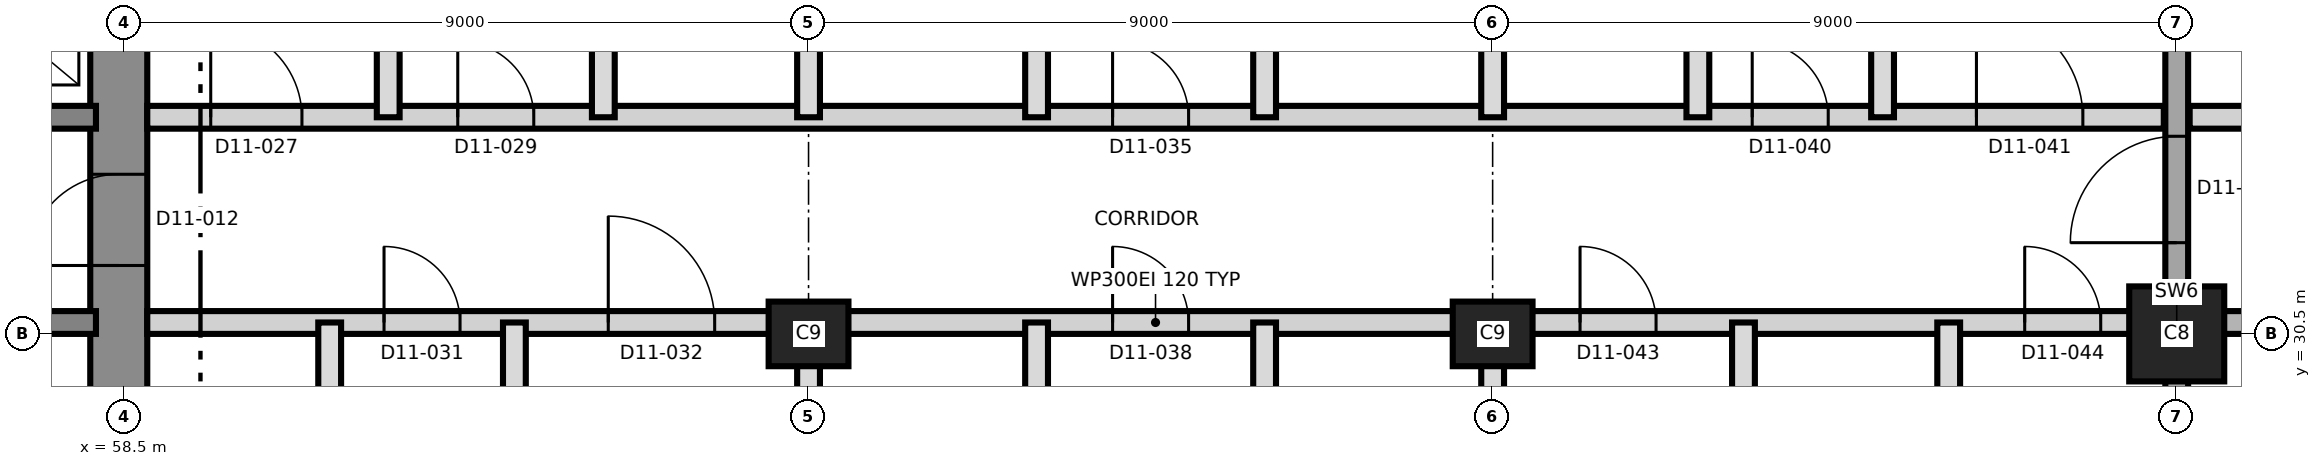
"""IFC4 building model, lengths in metres.
Left out: names, types, materials, properties, quantities, classifications, styles, units other than length and angle.
Written with IfcOpenShell. Run it as: python <this file> out.ifc"""

import sys

from ifc_helpers import new_model, si_unit, direction, frame, frame_2d, origin, origin_2d, place, context, subcontext, project, spatial, rectangle, extrude, element, fill, save


model = new_model("IFC4")
c1 = context("Model", 3, precision=1e-05, world=origin(), true_north=direction((0.0, 1.0)))
c2 = subcontext(c1, "Body", "Model", "MODEL_VIEW")
j1 = project(units=[si_unit("LENGTHUNIT", "METRE"), si_unit("PLANEANGLEUNIT", "RADIAN")], contexts=[c1])
p1 = place(None, origin())
s1 = spatial("IfcSite", under=j1, at=p1, CompositionType="ELEMENT")
p2 = place(p1, origin())
s2 = spatial("IfcBuilding", under=s1, at=p2, CompositionType="ELEMENT")
p3 = place(p2, frame((0.0, 0.0, 124.1)))
s3 = spatial("IfcBuildingStorey", under=s2, at=p3, CompositionType="ELEMENT", Elevation=124.1)
p4 = place(p3, frame((58.425, 21.125, 0.0), z_axis=(0.0, 0.0, 1.0), x_axis=(0.0, 1.0, 0.0)))
e1 = element("IfcWall", 1, at=p4, inside=s3, PredefinedType="SHEAR", context=c2, shape_type="SweptSolid", body=[
    extrude(rectangle(XDim=18.75, YDim=0.75, at=frame_2d((9.375, 0.0))), origin(), (0.0, 0.0, 1.0), 3.7),
])
p5 = place(p4, frame((10.275, 0.0, 0.0)))
e2 = element("IfcOpeningElement", 2, at=p5, cuts=e1, PredefinedType="OPENING", context=c2, shape_type="SweptSolid", body=[
    extrude(rectangle(XDim=1.2, YDim=2.1, at=frame_2d((0.6, 1.05))), frame((0.0, 0.385, 0.0), z_axis=(0.0, -1.0, 0.0), x_axis=(1.0, 0.0, 0.0)), (0.0, 0.0, 1.0), 0.77),
])
p6 = place(p3, frame((31.875, 30.65, 0.0), z_axis=(0.0, 0.0, 1.0), x_axis=(1.0, 0.0, 0.0)))
e3 = element("IfcWall", 3, at=p6, inside=s3, PredefinedType="SHEAR", context=c2, shape_type="SweptSolid", body=[
    extrude(rectangle(XDim=26.25, YDim=0.3, at=frame_2d((13.125, 0.0))), origin(), (0.0, 0.0, 1.0), 3.7),
])
p7 = place(p6, frame((24.625, 0.0, 0.0)))
e4 = element("IfcOpeningElement", 4, at=p7, cuts=e3, PredefinedType="OPENING", context=c2, shape_type="SweptSolid", body=[
    extrude(rectangle(XDim=1.0, YDim=2.1, at=frame_2d((0.5, 1.05))), frame((0.0, 0.16, 0.0), z_axis=(0.0, -1.0, 0.0), x_axis=(1.0, 0.0, 0.0)), (0.0, 0.0, 1.0), 0.32),
])
p8 = place(p6, frame((11.425, 0.0, 0.0)))
e5 = element("IfcOpeningElement", 5, at=p8, cuts=e3, PredefinedType="OPENING", context=c2, shape_type="SweptSolid", body=[
    extrude(rectangle(XDim=1.0, YDim=2.1, at=frame_2d((0.5, 1.05))), frame((0.0, 0.16, 0.0), z_axis=(0.0, -1.0, 0.0), x_axis=(1.0, 0.0, 0.0)), (0.0, 0.0, 1.0), 0.32),
])
p9 = place(p3, frame((31.875, 33.35, 0.0), z_axis=(0.0, 0.0, 1.0), x_axis=(1.0, 0.0, 0.0)))
e6 = element("IfcWall", 6, at=p9, inside=s3, PredefinedType="SHEAR", context=c2, shape_type="SweptSolid", body=[
    extrude(rectangle(XDim=26.25, YDim=0.3, at=frame_2d((13.125, 0.0))), origin(), (0.0, 0.0, 1.0), 3.7),
])
p10 = place(p9, frame((13.2, 0.0, 0.0)))
e7 = element("IfcOpeningElement", 7, at=p10, cuts=e6, PredefinedType="OPENING", context=c2, shape_type="SweptSolid", body=[
    extrude(rectangle(XDim=1.4, YDim=2.1, at=frame_2d((0.7, 1.05))), frame((0.0, 0.16, 0.0), z_axis=(0.0, -1.0, 0.0), x_axis=(1.0, 0.0, 0.0)), (0.0, 0.0, 1.0), 0.32),
])
p11 = place(p9, frame((5.25, 0.0, 0.0)))
e8 = element("IfcOpeningElement", 8, at=p11, cuts=e6, PredefinedType="OPENING", context=c2, shape_type="SweptSolid", body=[
    extrude(rectangle(XDim=1.2, YDim=2.1, at=frame_2d((0.6, 1.05))), frame((0.0, 0.16, 0.0), z_axis=(0.0, -1.0, 0.0), x_axis=(1.0, 0.0, 0.0)), (0.0, 0.0, 1.0), 0.32),
])
p12 = place(p9, frame((19.8, 0.0, 0.0)))
e9 = element("IfcOpeningElement", 9, at=p12, cuts=e6, PredefinedType="OPENING", context=c2, shape_type="SweptSolid", body=[
    extrude(rectangle(XDim=1.2, YDim=2.1, at=frame_2d((0.6, 1.05))), frame((0.0, 0.16, 0.0), z_axis=(0.0, -1.0, 0.0), x_axis=(1.0, 0.0, 0.0)), (0.0, 0.0, 1.0), 0.32),
])
for number, where, z_axis, x_axis in (
    (10, (67.5, 30.5, 0.0), (0.0, 0.0, 1.0), (1.0, 0.0, 0.0)),
    (11, (76.5, 30.5, 0.0), (0.0, 0.0, 1.0), (1.0, 0.0, 0.0)),
):
    element("IfcColumn", number, at=place(p3, frame(where, z_axis=z_axis, x_axis=x_axis)), inside=s3, PredefinedType="COLUMN", context=c2, shape_type="SweptSolid", body=[
        extrude(rectangle(XDim=1.05, YDim=0.85, at=origin_2d()), origin(), (0.0, 0.0, 1.0), 3.7),
    ])
p13 = place(p3, frame((85.5, 30.5, 0.0), z_axis=(0.0, 0.0, 1.0), x_axis=(1.0, 0.0, 0.0)))
e12 = element("IfcColumn", 12, at=p13, inside=s3, PredefinedType="COLUMN", context=c2, shape_type="SweptSolid", body=[
    extrude(rectangle(XDim=1.25, YDim=1.25, at=origin_2d()), origin(), (0.0, 0.0, 1.0), 3.7),
])
p14 = place(p3, frame((85.5, 20.135, 0.0), z_axis=(0.0, 0.0, 1.0), x_axis=(0.0, 1.0, 0.0)))
e13 = element("IfcWall", 13, at=p14, inside=s3, PredefinedType="SHEAR", context=c2, shape_type="SweptSolid", body=[
    extrude(rectangle(XDim=20.73, YDim=0.3, at=frame_2d((10.365, 0.0))), origin(), (0.0, 0.0, 1.0), 3.7),
])
p15 = place(p14, frame((11.565, 0.0, 0.0)))
e14 = element("IfcOpeningElement", 14, at=p15, cuts=e13, PredefinedType="OPENING", context=c2, shape_type="SweptSolid", body=[
    extrude(rectangle(XDim=1.4, YDim=2.1, at=frame_2d((0.7, 1.05))), frame((0.0, 0.16, 0.0), z_axis=(0.0, -1.0, 0.0), x_axis=(1.0, 0.0, 0.0)), (0.0, 0.0, 1.0), 0.32),
])
p16 = place(p3, frame((58.8, 30.65, 0.0), z_axis=(0.0, 0.0, 1.0), x_axis=(1.0, 0.0, 0.0)))
e15 = element("IfcWall", 15, at=p16, inside=s3, PredefinedType="PARTITIONING", context=c2, shape_type="SweptSolid", body=[
    extrude(rectangle(XDim=26.53, YDim=0.3, at=frame_2d((13.265, 0.0))), origin(), (0.0, 0.0, 1.0), 3.4),
])
p17 = place(p16, frame((3.115, 0.0, 0.0)))
e16 = element("IfcOpeningElement", 16, at=p17, cuts=e15, PredefinedType="OPENING", context=c2, shape_type="SweptSolid", body=[
    extrude(rectangle(XDim=1.0, YDim=2.1, at=frame_2d((0.5, 1.05))), frame((0.0, 0.16, 0.0), z_axis=(0.0, -1.0, 0.0), x_axis=(1.0, 0.0, 0.0)), (0.0, 0.0, 1.0), 0.32),
])
p18 = place(p16, frame((6.065, 0.0, 0.0)))
e17 = element("IfcOpeningElement", 17, at=p18, cuts=e15, PredefinedType="OPENING", context=c2, shape_type="SweptSolid", body=[
    extrude(rectangle(XDim=1.4, YDim=2.1, at=frame_2d((0.7, 1.05))), frame((0.0, 0.16, 0.0), z_axis=(0.0, -1.0, 0.0), x_axis=(1.0, 0.0, 0.0)), (0.0, 0.0, 1.0), 0.32),
])
p19 = place(p16, frame((12.7, 0.0, 0.0)))
e18 = element("IfcOpeningElement", 18, at=p19, cuts=e15, PredefinedType="OPENING", context=c2, shape_type="SweptSolid", body=[
    extrude(rectangle(XDim=1.0, YDim=2.4, at=frame_2d((0.5, 1.2))), frame((0.0, 0.16, 0.0), z_axis=(0.0, -1.0, 0.0), x_axis=(1.0, 0.0, 0.0)), (0.0, 0.0, 1.0), 0.32),
])
p20 = place(p16, frame((18.85, 0.0, 0.0)))
e19 = element("IfcOpeningElement", 19, at=p20, cuts=e15, PredefinedType="OPENING", context=c2, shape_type="SweptSolid", body=[
    extrude(rectangle(XDim=1.0, YDim=2.1, at=frame_2d((0.5, 1.05))), frame((0.0, 0.16, 0.0), z_axis=(0.0, -1.0, 0.0), x_axis=(1.0, 0.0, 0.0)), (0.0, 0.0, 1.0), 0.32),
])
p21 = place(p16, frame((24.7, 0.0, 0.0)))
e20 = element("IfcOpeningElement", 20, at=p21, cuts=e15, PredefinedType="OPENING", context=c2, shape_type="SweptSolid", body=[
    extrude(rectangle(XDim=1.0, YDim=2.1, at=frame_2d((0.5, 1.05))), frame((0.0, 0.16, 0.0), z_axis=(0.0, -1.0, 0.0), x_axis=(1.0, 0.0, 0.0)), (0.0, 0.0, 1.0), 0.32),
])
p22 = place(p3, frame((85.67, 30.65, 0.0), z_axis=(0.0, 0.0, 1.0), x_axis=(1.0, 0.0, 0.0)))
e21 = element("IfcWall", 21, at=p22, inside=s3, PredefinedType="SHEAR", context=c2, shape_type="SweptSolid", body=[
    extrude(rectangle(XDim=9.58, YDim=0.3, at=frame_2d((4.79, 0.0))), origin(), (0.0, 0.0, 1.0), 3.4),
])
p23 = place(p22, frame((2.08, 0.0, 0.0)))
e22 = element("IfcOpeningElement", 22, at=p23, cuts=e21, PredefinedType="OPENING", context=c2, shape_type="SweptSolid", body=[
    extrude(rectangle(XDim=1.2, YDim=2.1, at=frame_2d((0.6, 1.05))), frame((0.0, 0.16, 0.0), z_axis=(0.0, -1.0, 0.0), x_axis=(1.0, 0.0, 0.0)), (0.0, 0.0, 1.0), 0.32),
])
p24 = place(p22, frame((5.63, 0.0, 0.0)))
e23 = element("IfcOpeningElement", 23, at=p24, cuts=e21, PredefinedType="OPENING", context=c2, shape_type="SweptSolid", body=[
    extrude(rectangle(XDim=1.0, YDim=2.1, at=frame_2d((0.5, 1.05))), frame((0.0, 0.16, 0.0), z_axis=(0.0, -1.0, 0.0), x_axis=(1.0, 0.0, 0.0)), (0.0, 0.0, 1.0), 0.32),
])
p25 = place(p3, frame((58.8, 33.35, 0.0), z_axis=(0.0, 0.0, 1.0), x_axis=(1.0, 0.0, 0.0)))
e24 = element("IfcWall", 24, at=p25, inside=s3, PredefinedType="PARTITIONING", context=c2, shape_type="SweptSolid", body=[
    extrude(rectangle(XDim=26.53, YDim=0.3, at=frame_2d((13.265, 0.0))), origin(), (0.0, 0.0, 1.0), 3.4),
])
p26 = place(p25, frame((0.835, 0.0, 0.0)))
e25 = element("IfcOpeningElement", 25, at=p26, cuts=e24, PredefinedType="OPENING", context=c2, shape_type="SweptSolid", body=[
    extrude(rectangle(XDim=1.2, YDim=2.1, at=frame_2d((0.6, 1.05))), frame((0.0, 0.16, 0.0), z_axis=(0.0, -1.0, 0.0), x_axis=(1.0, 0.0, 0.0)), (0.0, 0.0, 1.0), 0.32),
])
p27 = place(p25, frame((4.085, 0.0, 0.0)))
e26 = element("IfcOpeningElement", 26, at=p27, cuts=e24, PredefinedType="OPENING", context=c2, shape_type="SweptSolid", body=[
    extrude(rectangle(XDim=1.0, YDim=2.1, at=frame_2d((0.5, 1.05))), frame((0.0, 0.16, 0.0), z_axis=(0.0, -1.0, 0.0), x_axis=(1.0, 0.0, 0.0)), (0.0, 0.0, 1.0), 0.32),
])
p28 = place(p25, frame((12.7, 0.0, 0.0)))
e27 = element("IfcOpeningElement", 27, at=p28, cuts=e24, PredefinedType="OPENING", context=c2, shape_type="SweptSolid", body=[
    extrude(rectangle(XDim=1.0, YDim=2.4, at=frame_2d((0.5, 1.2))), frame((0.0, 0.16, 0.0), z_axis=(0.0, -1.0, 0.0), x_axis=(1.0, 0.0, 0.0)), (0.0, 0.0, 1.0), 0.32),
])
p29 = place(p25, frame((21.115, 0.0, 0.0)))
e28 = element("IfcOpeningElement", 28, at=p29, cuts=e24, PredefinedType="OPENING", context=c2, shape_type="SweptSolid", body=[
    extrude(rectangle(XDim=1.0, YDim=2.1, at=frame_2d((0.5, 1.05))), frame((0.0, 0.16, 0.0), z_axis=(0.0, -1.0, 0.0), x_axis=(1.0, 0.0, 0.0)), (0.0, 0.0, 1.0), 0.32),
])
p30 = place(p25, frame((24.065, 0.0, 0.0)))
e29 = element("IfcOpeningElement", 29, at=p30, cuts=e24, PredefinedType="OPENING", context=c2, shape_type="SweptSolid", body=[
    extrude(rectangle(XDim=1.4, YDim=2.1, at=frame_2d((0.7, 1.05))), frame((0.0, 0.16, 0.0), z_axis=(0.0, -1.0, 0.0), x_axis=(1.0, 0.0, 0.0)), (0.0, 0.0, 1.0), 0.32),
])
p31 = place(p3, frame((85.67, 33.35, 0.0), z_axis=(0.0, 0.0, 1.0), x_axis=(1.0, 0.0, 0.0)))
e30 = element("IfcWall", 30, at=p31, inside=s3, PredefinedType="PARTITIONING", context=c2, shape_type="SweptSolid", body=[
    extrude(rectangle(XDim=9.58, YDim=0.3, at=frame_2d((4.79, 0.0))), origin(), (0.0, 0.0, 1.0), 3.4),
])
p32 = place(p31, frame((1.83, 0.0, 0.0)))
e31 = element("IfcOpeningElement", 31, at=p32, cuts=e30, PredefinedType="OPENING", context=c2, shape_type="SweptSolid", body=[
    extrude(rectangle(XDim=1.0, YDim=2.1, at=frame_2d((0.5, 1.05))), frame((0.0, 0.16, 0.0), z_axis=(0.0, -1.0, 0.0), x_axis=(1.0, 0.0, 0.0)), (0.0, 0.0, 1.0), 0.32),
])
p33 = place(p31, frame((5.63, 0.0, 0.0)))
e32 = element("IfcOpeningElement", 32, at=p33, cuts=e30, PredefinedType="OPENING", context=c2, shape_type="SweptSolid", body=[
    extrude(rectangle(XDim=1.0, YDim=2.1, at=frame_2d((0.5, 1.05))), frame((0.0, 0.16, 0.0), z_axis=(0.0, -1.0, 0.0), x_axis=(1.0, 0.0, 0.0)), (0.0, 0.0, 1.0), 0.32),
])
p34 = place(p3, frame((61.2, 27.45, 0.0), z_axis=(0.0, 0.0, 1.0), x_axis=(0.0, 1.0, 0.0)))
e33 = element("IfcWall", 33, at=p34, inside=s3, PredefinedType="PARTITIONING", context=c2, shape_type="SweptSolid", body=[
    extrude(rectangle(XDim=3.2, YDim=0.3, at=frame_2d((1.6, 0.0))), origin(), (0.0, 0.0, 1.0), 3.4),
])
p35 = place(p3, frame((61.97, 33.35, 0.0), z_axis=(0.0, 0.0, 1.0), x_axis=(0.0, 1.0, 0.0)))
e34 = element("IfcWall", 34, at=p35, inside=s3, PredefinedType="PARTITIONING", context=c2, shape_type="SweptSolid", body=[
    extrude(rectangle(XDim=7.695, YDim=0.3, at=frame_2d((3.847, 0.0))), origin(), (0.0, 0.0, 1.0), 3.4),
])
p36 = place(p3, frame((63.63, 20.135, 0.0), z_axis=(0.0, 0.0, 1.0), x_axis=(0.0, 1.0, 0.0)))
e35 = element("IfcWall", 35, at=p36, inside=s3, PredefinedType="PARTITIONING", context=c2, shape_type="SweptSolid", body=[
    extrude(rectangle(XDim=10.515, YDim=0.3, at=frame_2d((5.257, 0.0))), origin(), (0.0, 0.0, 1.0), 3.4),
])
p37 = place(p3, frame((64.8, 33.35, 0.0), z_axis=(0.0, 0.0, 1.0), x_axis=(0.0, 1.0, 0.0)))
e36 = element("IfcWall", 36, at=p37, inside=s3, PredefinedType="PARTITIONING", context=c2, shape_type="SweptSolid", body=[
    extrude(rectangle(XDim=3.2, YDim=0.3, at=frame_2d((1.6, 0.0))), origin(), (0.0, 0.0, 1.0), 3.4),
])
p38 = place(p3, frame((67.5, 20.135, 0.0), z_axis=(0.0, 0.0, 1.0), x_axis=(0.0, 1.0, 0.0)))
e37 = element("IfcWall", 37, at=p38, inside=s3, PredefinedType="PARTITIONING", context=c2, shape_type="SweptSolid", body=[
    extrude(rectangle(XDim=10.515, YDim=0.3, at=frame_2d((5.257, 0.0))), origin(), (0.0, 0.0, 1.0), 3.4),
])
p39 = place(p3, frame((67.5, 33.35, 0.0), z_axis=(0.0, 0.0, 1.0), x_axis=(0.0, 1.0, 0.0)))
e38 = element("IfcWall", 38, at=p39, inside=s3, PredefinedType="PARTITIONING", context=c2, shape_type="SweptSolid", body=[
    extrude(rectangle(XDim=7.695, YDim=0.3, at=frame_2d((3.847, 0.0))), origin(), (0.0, 0.0, 1.0), 3.4),
])
for number, where, z_axis, x_axis in (
    (39, (70.5, 27.35, 0.0), (0.0, 0.0, 1.0), (0.0, 1.0, 0.0)),
    (40, (70.5, 33.35, 0.0), (0.0, 0.0, 1.0), (0.0, 1.0, 0.0)),
    (41, (73.5, 27.35, 0.0), (0.0, 0.0, 1.0), (0.0, 1.0, 0.0)),
    (42, (73.5, 33.35, 0.0), (0.0, 0.0, 1.0), (0.0, 1.0, 0.0)),
):
    element("IfcWall", number, at=place(p3, frame(where, z_axis=z_axis, x_axis=x_axis)), inside=s3, PredefinedType="PARTITIONING", context=c2, shape_type="SweptSolid", body=[
        extrude(rectangle(XDim=3.3, YDim=0.3, at=frame_2d((1.65, 0.0))), origin(), (0.0, 0.0, 1.0), 3.4),
    ])
p40 = place(p3, frame((76.5, 20.135, 0.0), z_axis=(0.0, 0.0, 1.0), x_axis=(0.0, 1.0, 0.0)))
e43 = element("IfcWall", 43, at=p40, inside=s3, PredefinedType="PARTITIONING", context=c2, shape_type="SweptSolid", body=[
    extrude(rectangle(XDim=10.515, YDim=0.3, at=frame_2d((5.257, 0.0))), origin(), (0.0, 0.0, 1.0), 3.4),
])
p41 = place(p3, frame((76.5, 33.35, 0.0), z_axis=(0.0, 0.0, 1.0), x_axis=(0.0, 1.0, 0.0)))
e44 = element("IfcWall", 44, at=p41, inside=s3, PredefinedType="PARTITIONING", context=c2, shape_type="SweptSolid", body=[
    extrude(rectangle(XDim=7.695, YDim=0.3, at=frame_2d((3.847, 0.0))), origin(), (0.0, 0.0, 1.0), 3.4),
])
for number, where, z_axis, x_axis in (
    (45, (79.2, 33.35, 0.0), (0.0, 0.0, 1.0), (0.0, 1.0, 0.0)),
    (46, (79.8, 27.45, 0.0), (0.0, 0.0, 1.0), (0.0, 1.0, 0.0)),
):
    element("IfcWall", number, at=place(p3, frame(where, z_axis=z_axis, x_axis=x_axis)), inside=s3, PredefinedType="PARTITIONING", context=c2, shape_type="SweptSolid", body=[
        extrude(rectangle(XDim=3.2, YDim=0.3, at=frame_2d((1.6, 0.0))), origin(), (0.0, 0.0, 1.0), 3.4),
    ])
p42 = place(p3, frame((81.63, 33.35, 0.0), z_axis=(0.0, 0.0, 1.0), x_axis=(0.0, 1.0, 0.0)))
e47 = element("IfcWall", 47, at=p42, inside=s3, PredefinedType="PARTITIONING", context=c2, shape_type="SweptSolid", body=[
    extrude(rectangle(XDim=7.695, YDim=0.3, at=frame_2d((3.847, 0.0))), origin(), (0.0, 0.0, 1.0), 3.4),
])
p43 = place(p3, frame((82.5, 20.135, 0.0), z_axis=(0.0, 0.0, 1.0), x_axis=(0.0, 1.0, 0.0)))
e48 = element("IfcWall", 48, at=p43, inside=s3, PredefinedType="PARTITIONING", context=c2, shape_type="SweptSolid", body=[
    extrude(rectangle(XDim=10.515, YDim=0.3, at=frame_2d((5.257, 0.0))), origin(), (0.0, 0.0, 1.0), 3.4),
])
p44 = place(p5, origin())
e49 = element("IfcDoor", 49, at=p44, inside=s3, OperationType="SINGLE_SWING_LEFT", PredefinedType="DOOR", context=c2, shape_type="SweptSolid", body=[
    extrude(rectangle(XDim=1.2, YDim=2.1, at=frame_2d((0.6, 1.05))), frame((0.0, 0.025, 0.0), z_axis=(0.0, -1.0, 0.0), x_axis=(1.0, 0.0, 0.0)), (0.0, 0.0, 1.0), 0.05),
])
fill(e2, e49)
p45 = place(p26, origin())
e50 = element("IfcDoor", 50, at=p45, inside=s3, OperationType="SINGLE_SWING_LEFT", PredefinedType="DOOR", context=c2, shape_type="SweptSolid", body=[
    extrude(rectangle(XDim=1.2, YDim=2.1, at=frame_2d((0.6, 1.05))), frame((0.0, 0.025, 0.0), z_axis=(0.0, -1.0, 0.0), x_axis=(1.0, 0.0, 0.0)), (0.0, 0.0, 1.0), 0.05),
])
fill(e25, e50)
p46 = place(p27, origin())
e51 = element("IfcDoor", 51, at=p46, inside=s3, OperationType="SINGLE_SWING_LEFT", PredefinedType="DOOR", context=c2, shape_type="SweptSolid", body=[
    extrude(rectangle(XDim=1.0, YDim=2.1, at=frame_2d((0.5, 1.05))), frame((0.0, 0.025, 0.0), z_axis=(0.0, -1.0, 0.0), x_axis=(1.0, 0.0, 0.0)), (0.0, 0.0, 1.0), 0.05),
])
fill(e26, e51)
p47 = place(p17, origin())
e52 = element("IfcDoor", 52, at=p47, inside=s3, OperationType="SINGLE_SWING_LEFT", PredefinedType="DOOR", context=c2, shape_type="SweptSolid", body=[
    extrude(rectangle(XDim=1.0, YDim=2.1, at=frame_2d((0.5, 1.05))), frame((0.0, 0.025, 0.0), z_axis=(0.0, -1.0, 0.0), x_axis=(1.0, 0.0, 0.0)), (0.0, 0.0, 1.0), 0.05),
])
fill(e16, e52)
p48 = place(p18, origin())
e53 = element("IfcDoor", 53, at=p48, inside=s3, OperationType="SINGLE_SWING_RIGHT", PredefinedType="DOOR", context=c2, shape_type="SweptSolid", body=[
    extrude(rectangle(XDim=1.4, YDim=2.1, at=frame_2d((0.7, 1.05))), frame((0.0, 0.025, 0.0), z_axis=(0.0, -1.0, 0.0), x_axis=(1.0, 0.0, 0.0)), (0.0, 0.0, 1.0), 0.05),
])
fill(e17, e53)
p49 = place(p28, origin())
e54 = element("IfcDoor", 54, at=p49, inside=s3, OperationType="SINGLE_SWING_LEFT", PredefinedType="DOOR", context=c2, shape_type="SweptSolid", body=[
    extrude(rectangle(XDim=1.0, YDim=2.4, at=frame_2d((0.5, 1.2))), frame((0.0, 0.025, 0.0), z_axis=(0.0, -1.0, 0.0), x_axis=(1.0, 0.0, 0.0)), (0.0, 0.0, 1.0), 0.05),
])
fill(e27, e54)
p50 = place(p19, origin())
e55 = element("IfcDoor", 55, at=p50, inside=s3, OperationType="SINGLE_SWING_LEFT", PredefinedType="DOOR", context=c2, shape_type="SweptSolid", body=[
    extrude(rectangle(XDim=1.0, YDim=2.4, at=frame_2d((0.5, 1.2))), frame((0.0, 0.025, 0.0), z_axis=(0.0, -1.0, 0.0), x_axis=(1.0, 0.0, 0.0)), (0.0, 0.0, 1.0), 0.05),
])
fill(e18, e55)
p51 = place(p29, origin())
e56 = element("IfcDoor", 56, at=p51, inside=s3, OperationType="SINGLE_SWING_LEFT", PredefinedType="DOOR", context=c2, shape_type="SweptSolid", body=[
    extrude(rectangle(XDim=1.0, YDim=2.1, at=frame_2d((0.5, 1.05))), frame((0.0, 0.025, 0.0), z_axis=(0.0, -1.0, 0.0), x_axis=(1.0, 0.0, 0.0)), (0.0, 0.0, 1.0), 0.05),
])
fill(e28, e56)
p52 = place(p30, origin())
e57 = element("IfcDoor", 57, at=p52, inside=s3, OperationType="SINGLE_SWING_RIGHT", PredefinedType="DOOR", context=c2, shape_type="SweptSolid", body=[
    extrude(rectangle(XDim=1.4, YDim=2.1, at=frame_2d((0.7, 1.05))), frame((0.0, 0.025, 0.0), z_axis=(0.0, -1.0, 0.0), x_axis=(1.0, 0.0, 0.0)), (0.0, 0.0, 1.0), 0.05),
])
fill(e29, e57)
p53 = place(p20, origin())
e58 = element("IfcDoor", 58, at=p53, inside=s3, OperationType="SINGLE_SWING_LEFT", PredefinedType="DOOR", context=c2, shape_type="SweptSolid", body=[
    extrude(rectangle(XDim=1.0, YDim=2.1, at=frame_2d((0.5, 1.05))), frame((0.0, 0.025, 0.0), z_axis=(0.0, -1.0, 0.0), x_axis=(1.0, 0.0, 0.0)), (0.0, 0.0, 1.0), 0.05),
])
fill(e19, e58)
p54 = place(p21, origin())
e59 = element("IfcDoor", 59, at=p54, inside=s3, OperationType="SINGLE_SWING_RIGHT", PredefinedType="DOOR", context=c2, shape_type="SweptSolid", body=[
    extrude(rectangle(XDim=1.0, YDim=2.1, at=frame_2d((0.5, 1.05))), frame((0.0, 0.025, 0.0), z_axis=(0.0, -1.0, 0.0), x_axis=(1.0, 0.0, 0.0)), (0.0, 0.0, 1.0), 0.05),
])
fill(e20, e59)
p55 = place(p15, origin())
e60 = element("IfcDoor", 60, at=p55, inside=s3, OperationType="SINGLE_SWING_RIGHT", PredefinedType="DOOR", context=c2, shape_type="SweptSolid", body=[
    extrude(rectangle(XDim=1.4, YDim=2.1, at=frame_2d((0.7, 1.05))), frame((0.0, 0.025, 0.0), z_axis=(0.0, -1.0, 0.0), x_axis=(1.0, 0.0, 0.0)), (0.0, 0.0, 1.0), 0.05),
])
fill(e14, e60)
save(model, sys.argv[1])
